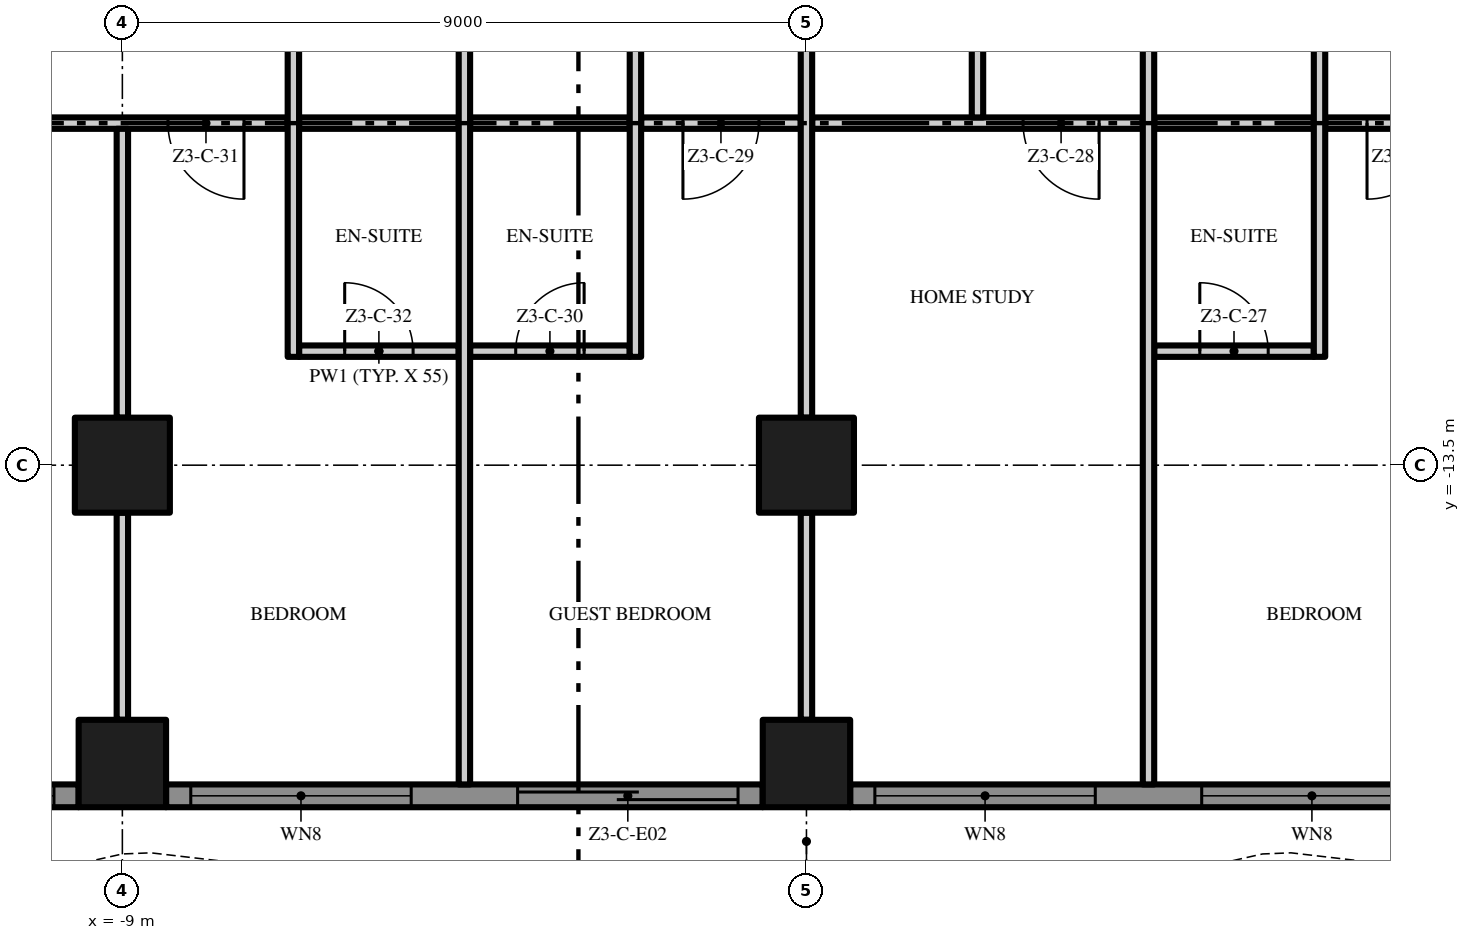
"""IFC4 building model, lengths in metres.
Left out: names, types, materials, properties, quantities, classifications, styles, units other than length and angle.
Written with IfcOpenShell. Run it as: python <this file> out.ifc"""

import sys

from ifc_helpers import new_model, si_unit, direction, frame, frame_2d, origin, origin_2d, place, context, subcontext, project, spatial, polyline, rectangle, outline, extrude, element, fill, save


model = new_model("IFC4")
c1 = context("Model", 3, precision=1e-05, world=origin(), true_north=direction((0.0, 1.0)))
c2 = subcontext(c1, "Body", "Model", "MODEL_VIEW")
j1 = project(units=[si_unit("LENGTHUNIT", "METRE"), si_unit("PLANEANGLEUNIT", "RADIAN")], contexts=[c1])
p1 = place(None, origin())
s1 = spatial("IfcSite", under=j1, at=p1, CompositionType="ELEMENT")
p2 = place(p1, origin())
s2 = spatial("IfcBuilding", under=s1, at=p2, CompositionType="ELEMENT")
p3 = place(p2, frame((0.0, 0.0, 147.8)))
s3 = spatial("IfcBuildingStorey", under=s2, at=p3, CompositionType="ELEMENT", Elevation=147.8)
p4 = place(p3, frame((-9.0, -13.5, 0.0), z_axis=(0.0, 0.0, 1.0), x_axis=(1.0, 0.0, 0.0)))
e1 = element("IfcColumn", 1, at=p4, inside=s3, PredefinedType="COLUMN", context=c2, shape_type="SweptSolid", body=[
    extrude(rectangle(XDim=1.25, YDim=1.25, at=origin_2d()), origin(), (0.0, 0.0, 1.0), 3.5),
])
p5 = place(p3, frame((-9.0, -17.425, 0.0), z_axis=(0.0, 0.0, 1.0), x_axis=(1.0, 0.0, 0.0)))
e2 = element("IfcColumn", 2, at=p5, inside=s3, PredefinedType="COLUMN", context=c2, shape_type="SweptSolid", body=[
    extrude(rectangle(XDim=1.15, YDim=1.15, at=origin_2d()), origin(), (0.0, 0.0, 1.0), 3.5),
])
p6 = place(p3, frame((0.0, -13.5, 0.0), z_axis=(0.0, 0.0, 1.0), x_axis=(1.0, 0.0, 0.0)))
e3 = element("IfcColumn", 3, at=p6, inside=s3, PredefinedType="COLUMN", context=c2, shape_type="SweptSolid", body=[
    extrude(rectangle(XDim=1.25, YDim=1.25, at=origin_2d()), origin(), (0.0, 0.0, 1.0), 3.5),
])
p7 = place(p3, frame((0.0, -17.425, 0.0), z_axis=(0.0, 0.0, 1.0), x_axis=(1.0, 0.0, 0.0)))
e4 = element("IfcColumn", 4, at=p7, inside=s3, PredefinedType="COLUMN", context=c2, shape_type="SweptSolid", body=[
    extrude(rectangle(XDim=1.15, YDim=1.15, at=origin_2d()), origin(), (0.0, 0.0, 1.0), 3.5),
])
p8 = place(p3, frame((-9.575, -17.85, 0.0), z_axis=(0.0, 0.0, 1.0), x_axis=(-1.0, 0.0, 0.0)))
e5 = element("IfcWall", 5, at=p8, inside=s3, PredefinedType="SOLIDWALL", context=c2, shape_type="SweptSolid", body=[
    extrude(rectangle(XDim=7.275, YDim=0.3, at=frame_2d((3.638, 0.0))), origin(), (0.0, 0.0, 1.0), 3.5),
])
p9 = place(p8, frame((4.625, 0.0, 0.0)))
e6 = element("IfcOpeningElement", 6, at=p9, cuts=e5, PredefinedType="OPENING", context=c2, shape_type="SweptSolid", body=[
    extrude(rectangle(XDim=2.35, YDim=2.4, at=frame_2d((1.175, 1.2))), frame((0.0, 0.16, 0.0), z_axis=(0.0, -1.0, 0.0), x_axis=(1.0, 0.0, 0.0)), (0.0, 0.0, 1.0), 0.32),
])
p10 = place(p8, frame((0.325, 0.0, 0.45)))
e7 = element("IfcOpeningElement", 7, at=p10, cuts=e5, PredefinedType="OPENING", context=c2, shape_type="SweptSolid", body=[
    extrude(rectangle(XDim=2.9, YDim=2.65, at=frame_2d((1.45, 1.325))), frame((0.0, 0.16, 0.0), z_axis=(0.0, -1.0, 0.0), x_axis=(1.0, 0.0, 0.0)), (0.0, 0.0, 1.0), 0.32),
])
p11 = place(p3, frame((-0.575, -17.85, 0.0), z_axis=(0.0, 0.0, 1.0), x_axis=(-1.0, 0.0, 0.0)))
e8 = element("IfcWall", 8, at=p11, inside=s3, PredefinedType="SOLIDWALL", context=c2, shape_type="SweptSolid", body=[
    extrude(rectangle(XDim=7.85, YDim=0.3, at=frame_2d((3.925, 0.0))), origin(), (0.0, 0.0, 1.0), 3.5),
])
p12 = place(p11, frame((4.625, 0.0, 0.45)))
e9 = element("IfcOpeningElement", 9, at=p12, cuts=e8, PredefinedType="OPENING", context=c2, shape_type="SweptSolid", body=[
    extrude(rectangle(XDim=2.9, YDim=2.65, at=frame_2d((1.45, 1.325))), frame((0.0, 0.16, 0.0), z_axis=(0.0, -1.0, 0.0), x_axis=(1.0, 0.0, 0.0)), (0.0, 0.0, 1.0), 0.32),
])
p13 = place(p11, frame((0.325, 0.0, 0.0)))
e10 = element("IfcOpeningElement", 10, at=p13, cuts=e8, PredefinedType="OPENING", context=c2, shape_type="SweptSolid", body=[
    extrude(rectangle(XDim=2.9, YDim=2.4, at=frame_2d((1.45, 1.2))), frame((0.0, 0.16, 0.0), z_axis=(0.0, -1.0, 0.0), x_axis=(1.0, 0.0, 0.0)), (0.0, 0.0, 1.0), 0.32),
])
p14 = place(p3, frame((8.425, -17.85, 0.0), z_axis=(0.0, 0.0, 1.0), x_axis=(-1.0, 0.0, 0.0)))
e11 = element("IfcWall", 11, at=p14, inside=s3, PredefinedType="SOLIDWALL", context=c2, shape_type="SweptSolid", body=[
    extrude(rectangle(XDim=7.85, YDim=0.3, at=frame_2d((3.925, 0.0))), origin(), (0.0, 0.0, 1.0), 3.5),
])
p15 = place(p14, frame((4.625, 0.0, 0.45)))
e12 = element("IfcOpeningElement", 12, at=p15, cuts=e11, PredefinedType="OPENING", context=c2, shape_type="SweptSolid", body=[
    extrude(rectangle(XDim=2.9, YDim=2.65, at=frame_2d((1.45, 1.325))), frame((0.0, 0.16, 0.0), z_axis=(0.0, -1.0, 0.0), x_axis=(1.0, 0.0, 0.0)), (0.0, 0.0, 1.0), 0.32),
])
p16 = place(p14, frame((0.325, 0.0, 0.45)))
e13 = element("IfcOpeningElement", 13, at=p16, cuts=e11, PredefinedType="OPENING", context=c2, shape_type="SweptSolid", body=[
    extrude(rectangle(XDim=2.9, YDim=2.65, at=frame_2d((1.45, 1.325))), frame((0.0, 0.16, 0.0), z_axis=(0.0, -1.0, 0.0), x_axis=(1.0, 0.0, 0.0)), (0.0, 0.0, 1.0), 0.32),
])
p17 = place(p3, origin())
e14 = element("IfcWall", 14, at=p17, inside=s3, PredefinedType="USERDEFINED", context=c2, shape_type="SweptSolid", body=[
    extrude(outline(polyline([(-18.0, -20.649), (-16.5, -20.985), (-16.125, -21.0), (-15.0, -20.869), (-13.5, -20.345), (-12.0, -19.612), (-10.5, -18.951), (-9.0, -18.615), (-8.625, -18.6), (-7.5, -18.731), (-6.0, -19.255), (-4.5, -19.988), (-3.0, -20.649), (-1.5, -20.985), (-1.125, -21.0), (0.0, -20.869), (1.5, -20.345), (3.0, -19.612), (4.5, -18.951), (6.0, -18.615), (6.375, -18.6), (7.5, -18.731), (9.0, -19.255), (10.5, -19.988), (12.0, -20.649), (13.5, -20.985), (13.875, -21.0), (15.0, -20.869), (16.5, -20.345), (18.0, -19.612), (17.89, -19.388), (16.404, -20.114), (14.944, -20.624), (13.865, -20.749), (13.533, -20.736), (12.079, -20.41), (10.605, -19.761), (9.096, -19.024), (7.556, -18.486), (6.385, -18.349), (5.967, -18.366), (4.421, -18.713), (2.895, -19.385), (1.404, -20.114), (-0.056, -20.624), (-1.135, -20.749), (-1.467, -20.736), (-2.921, -20.41), (-4.395, -19.761), (-5.904, -19.024), (-7.444, -18.486), (-8.615, -18.349), (-9.033, -18.366), (-10.579, -18.713), (-12.105, -19.385), (-13.596, -20.114), (-15.056, -20.624), (-16.135, -20.749), (-16.467, -20.736), (-17.945, -20.405), (-18.0, -20.649)])), origin(), (0.0, 0.0, 1.0), 0.9),
])
p18 = place(p3, frame((-6.675, -12.0, 0.0), z_axis=(0.0, 0.0, 1.0), x_axis=(1.0, 0.0, 0.0)))
e15 = element("IfcWall", 15, at=p18, inside=s3, PredefinedType="PARTITIONING", context=c2, shape_type="SweptSolid", body=[
    extrude(rectangle(XDim=2.1, YDim=0.15, at=frame_2d((1.05, 0.0))), origin(), (0.0, 0.0, 1.0), 3.5),
])
p19 = place(p18, frame((0.6, 0.0, 0.0)))
e16 = element("IfcOpeningElement", 16, at=p19, cuts=e15, PredefinedType="OPENING", context=c2, shape_type="SweptSolid", body=[
    extrude(rectangle(XDim=0.9, YDim=2.1, at=frame_2d((0.45, 1.05))), frame((0.0, 0.085, 0.0), z_axis=(0.0, -1.0, 0.0), x_axis=(1.0, 0.0, 0.0)), (0.0, 0.0, 1.0), 0.17),
])
p20 = place(p3, frame((-4.425, -12.0, 0.0), z_axis=(0.0, 0.0, 1.0), x_axis=(1.0, 0.0, 0.0)))
e17 = element("IfcWall", 17, at=p20, inside=s3, PredefinedType="PARTITIONING", context=c2, shape_type="SweptSolid", body=[
    extrude(rectangle(XDim=2.1, YDim=0.15, at=frame_2d((1.05, 0.0))), origin(), (0.0, 0.0, 1.0), 3.5),
])
p21 = place(p20, frame((0.6, 0.0, 0.0)))
e18 = element("IfcOpeningElement", 18, at=p21, cuts=e17, PredefinedType="OPENING", context=c2, shape_type="SweptSolid", body=[
    extrude(rectangle(XDim=0.9, YDim=2.1, at=frame_2d((0.45, 1.05))), frame((0.0, 0.085, 0.0), z_axis=(0.0, -1.0, 0.0), x_axis=(1.0, 0.0, 0.0)), (0.0, 0.0, 1.0), 0.17),
])
p22 = place(p3, frame((4.575, -12.0, 0.0), z_axis=(0.0, 0.0, 1.0), x_axis=(1.0, 0.0, 0.0)))
e19 = element("IfcWall", 19, at=p22, inside=s3, PredefinedType="PARTITIONING", context=c2, shape_type="SweptSolid", body=[
    extrude(rectangle(XDim=2.1, YDim=0.15, at=frame_2d((1.05, 0.0))), origin(), (0.0, 0.0, 1.0), 3.5),
])
p23 = place(p22, frame((0.6, 0.0, 0.0)))
e20 = element("IfcOpeningElement", 20, at=p23, cuts=e19, PredefinedType="OPENING", context=c2, shape_type="SweptSolid", body=[
    extrude(rectangle(XDim=0.9, YDim=2.1, at=frame_2d((0.45, 1.05))), frame((0.0, 0.085, 0.0), z_axis=(0.0, -1.0, 0.0), x_axis=(1.0, 0.0, 0.0)), (0.0, 0.0, 1.0), 0.17),
])
p24 = place(p3, frame((-6.825, -9.0, 0.0), z_axis=(0.0, 0.0, 1.0), x_axis=(-1.0, 0.0, 0.0)))
e21 = element("IfcWall", 21, at=p24, inside=s3, PredefinedType="PARTITIONING", context=c2, shape_type="SweptSolid", body=[
    extrude(rectangle(XDim=11.1, YDim=0.15, at=frame_2d((5.55, 0.0))), origin(), (0.0, 0.0, 1.0), 3.5),
])
p25 = place(p24, frame((0.575, 0.0, 0.0)))
e22 = element("IfcOpeningElement", 22, at=p25, cuts=e21, PredefinedType="OPENING", context=c2, shape_type="SweptSolid", body=[
    extrude(rectangle(XDim=1.0, YDim=2.4, at=frame_2d((0.5, 1.2))), frame((0.0, 0.085, 0.0), z_axis=(0.0, -1.0, 0.0), x_axis=(1.0, 0.0, 0.0)), (0.0, 0.0, 1.0), 0.17),
])
p26 = place(p24, frame((3.325, 0.0, 0.0)))
e23 = element("IfcOpeningElement", 23, at=p26, cuts=e21, PredefinedType="OPENING", context=c2, shape_type="SweptSolid", body=[
    extrude(rectangle(XDim=1.5, YDim=2.4, at=frame_2d((0.75, 1.2))), frame((0.0, 0.085, 0.0), z_axis=(0.0, -1.0, 0.0), x_axis=(1.0, 0.0, 0.0)), (0.0, 0.0, 1.0), 0.17),
])
for number, where, z_axis, x_axis in (
    (24, (-6.675, -9.0, 0.0), (0.0, 0.0, 1.0), (1.0, 0.0, 0.0)),
    (25, (-4.425, -9.0, 0.0), (0.0, 0.0, 1.0), (1.0, 0.0, 0.0)),
):
    element("IfcWall", number, at=place(p3, frame(where, z_axis=z_axis, x_axis=x_axis)), inside=s3, PredefinedType="PARTITIONING", context=c2, shape_type="SweptSolid", body=[
        extrude(rectangle(XDim=2.1, YDim=0.15, at=frame_2d((1.05, 0.0))), origin(), (0.0, 0.0, 1.0), 3.5),
    ])
p27 = place(p3, frame((-0.075, -9.0, 0.0), z_axis=(0.0, 0.0, 1.0), x_axis=(-1.0, 0.0, 0.0)))
e26 = element("IfcWall", 26, at=p27, inside=s3, PredefinedType="PARTITIONING", context=c2, shape_type="SweptSolid", body=[
    extrude(rectangle(XDim=2.1, YDim=0.15, at=frame_2d((1.05, 0.0))), origin(), (0.0, 0.0, 1.0), 3.5),
])
p28 = place(p27, frame((0.55, 0.0, 0.0)))
e27 = element("IfcOpeningElement", 27, at=p28, cuts=e26, PredefinedType="OPENING", context=c2, shape_type="SweptSolid", body=[
    extrude(rectangle(XDim=1.0, YDim=2.4, at=frame_2d((0.5, 1.2))), frame((0.0, 0.085, 0.0), z_axis=(0.0, -1.0, 0.0), x_axis=(1.0, 0.0, 0.0)), (0.0, 0.0, 1.0), 0.17),
])
p29 = place(p3, frame((4.425, -9.0, 0.0), z_axis=(0.0, 0.0, 1.0), x_axis=(-1.0, 0.0, 0.0)))
e28 = element("IfcWall", 28, at=p29, inside=s3, PredefinedType="PARTITIONING", context=c2, shape_type="SweptSolid", body=[
    extrude(rectangle(XDim=4.35, YDim=0.15, at=frame_2d((2.175, 0.0))), origin(), (0.0, 0.0, 1.0), 3.5),
])
p30 = place(p29, frame((0.575, 0.0, 0.0)))
e29 = element("IfcOpeningElement", 29, at=p30, cuts=e28, PredefinedType="OPENING", context=c2, shape_type="SweptSolid", body=[
    extrude(rectangle(XDim=1.0, YDim=2.4, at=frame_2d((0.5, 1.2))), frame((0.0, 0.085, 0.0), z_axis=(0.0, -1.0, 0.0), x_axis=(1.0, 0.0, 0.0)), (0.0, 0.0, 1.0), 0.17),
])
p31 = place(p3, frame((4.575, -9.0, 0.0), z_axis=(0.0, 0.0, 1.0), x_axis=(1.0, 0.0, 0.0)))
e30 = element("IfcWall", 30, at=p31, inside=s3, PredefinedType="PARTITIONING", context=c2, shape_type="SweptSolid", body=[
    extrude(rectangle(XDim=2.1, YDim=0.15, at=frame_2d((1.05, 0.0))), origin(), (0.0, 0.0, 1.0), 3.5),
])
p32 = place(p3, frame((11.175, -9.0, 0.0), z_axis=(0.0, 0.0, 1.0), x_axis=(-1.0, 0.0, 0.0)))
e31 = element("IfcWall", 31, at=p32, inside=s3, PredefinedType="PARTITIONING", context=c2, shape_type="SweptSolid", body=[
    extrude(rectangle(XDim=4.35, YDim=0.15, at=frame_2d((2.175, 0.0))), origin(), (0.0, 0.0, 1.0), 3.5),
])
p33 = place(p32, frame((0.575, 0.0, 0.0)))
e32 = element("IfcOpeningElement", 32, at=p33, cuts=e31, PredefinedType="OPENING", context=c2, shape_type="SweptSolid", body=[
    extrude(rectangle(XDim=1.0, YDim=2.4, at=frame_2d((0.5, 1.2))), frame((0.0, 0.085, 0.0), z_axis=(0.0, -1.0, 0.0), x_axis=(1.0, 0.0, 0.0)), (0.0, 0.0, 1.0), 0.17),
])
p34 = place(p32, frame((2.8, 0.0, 0.0)))
e33 = element("IfcOpeningElement", 33, at=p34, cuts=e31, PredefinedType="OPENING", context=c2, shape_type="SweptSolid", body=[
    extrude(rectangle(XDim=1.0, YDim=2.4, at=frame_2d((0.5, 1.2))), frame((0.0, 0.085, 0.0), z_axis=(0.0, -1.0, 0.0), x_axis=(1.0, 0.0, 0.0)), (0.0, 0.0, 1.0), 0.17),
])
p35 = place(p3, frame((-9.0, -16.85, 0.0), z_axis=(0.0, 0.0, 1.0), x_axis=(0.0, 1.0, 0.0)))
e34 = element("IfcWall", 34, at=p35, inside=s3, PredefinedType="PARTITIONING", context=c2, shape_type="SweptSolid", body=[
    extrude(rectangle(XDim=2.725, YDim=0.15, at=frame_2d((1.363, 0.0))), origin(), (0.0, 0.0, 1.0), 3.5),
])
p36 = place(p3, frame((-9.0, -12.875, 0.0), z_axis=(0.0, 0.0, 1.0), x_axis=(0.0, 1.0, 0.0)))
e35 = element("IfcWall", 35, at=p36, inside=s3, PredefinedType="PARTITIONING", context=c2, shape_type="SweptSolid", body=[
    extrude(rectangle(XDim=3.8, YDim=0.15, at=frame_2d((1.9, 0.0))), origin(), (0.0, 0.0, 1.0), 3.5),
])
p37 = place(p3, frame((-6.75, -12.075, 0.0), z_axis=(0.0, 0.0, 1.0), x_axis=(0.0, 1.0, 0.0)))
e36 = element("IfcWall", 36, at=p37, inside=s3, PredefinedType="PARTITIONING", context=c2, shape_type="SweptSolid", body=[
    extrude(rectangle(XDim=7.65, YDim=0.15, at=frame_2d((3.825, 0.0))), origin(), (0.0, 0.0, 1.0), 3.5),
])
p38 = place(p3, frame((-4.5, -17.7, 0.0), z_axis=(0.0, 0.0, 1.0), x_axis=(0.0, 1.0, 0.0)))
e37 = element("IfcWall", 37, at=p38, inside=s3, PredefinedType="PARTITIONING", context=c2, shape_type="SweptSolid", body=[
    extrude(rectangle(XDim=13.125, YDim=0.15, at=frame_2d((6.562, 0.0))), origin(), (0.0, 0.0, 1.0), 3.5),
])
p39 = place(p3, frame((-2.25, -12.075, 0.0), z_axis=(0.0, 0.0, 1.0), x_axis=(0.0, 1.0, 0.0)))
e38 = element("IfcWall", 38, at=p39, inside=s3, PredefinedType="PARTITIONING", context=c2, shape_type="SweptSolid", body=[
    extrude(rectangle(XDim=7.65, YDim=0.15, at=frame_2d((3.825, 0.0))), origin(), (0.0, 0.0, 1.0), 3.5),
])
p40 = place(p3, frame((0.0, -16.85, 0.0), z_axis=(0.0, 0.0, 1.0), x_axis=(0.0, 1.0, 0.0)))
e39 = element("IfcWall", 39, at=p40, inside=s3, PredefinedType="PARTITIONING", context=c2, shape_type="SweptSolid", body=[
    extrude(rectangle(XDim=2.725, YDim=0.15, at=frame_2d((1.363, 0.0))), origin(), (0.0, 0.0, 1.0), 3.5),
])
p41 = place(p3, frame((0.0, -12.875, 0.0), z_axis=(0.0, 0.0, 1.0), x_axis=(0.0, 1.0, 0.0)))
e40 = element("IfcWall", 40, at=p41, inside=s3, PredefinedType="PARTITIONING", context=c2, shape_type="SweptSolid", body=[
    extrude(rectangle(XDim=7.75, YDim=0.15, at=frame_2d((3.875, 0.0))), origin(), (0.0, 0.0, 1.0), 3.5),
])
p42 = place(p3, frame((2.25, -8.925, 0.0), z_axis=(0.0, 0.0, 1.0), x_axis=(0.0, 1.0, 0.0)))
e41 = element("IfcWall", 41, at=p42, inside=s3, PredefinedType="PARTITIONING", context=c2, shape_type="SweptSolid", body=[
    extrude(rectangle(XDim=4.5, YDim=0.15, at=frame_2d((2.25, 0.0))), origin(), (0.0, 0.0, 1.0), 3.5),
])
p43 = place(p3, frame((4.5, -17.7, 0.0), z_axis=(0.0, 0.0, 1.0), x_axis=(0.0, 1.0, 0.0)))
e42 = element("IfcWall", 42, at=p43, inside=s3, PredefinedType="PARTITIONING", context=c2, shape_type="SweptSolid", body=[
    extrude(rectangle(XDim=13.275, YDim=0.15, at=frame_2d((6.638, 0.0))), origin(), (0.0, 0.0, 1.0), 3.5),
])
p44 = place(p3, frame((6.75, -12.075, 0.0), z_axis=(0.0, 0.0, 1.0), x_axis=(0.0, 1.0, 0.0)))
e43 = element("IfcWall", 43, at=p44, inside=s3, PredefinedType="PARTITIONING", context=c2, shape_type="SweptSolid", body=[
    extrude(rectangle(XDim=7.65, YDim=0.15, at=frame_2d((3.825, 0.0))), origin(), (0.0, 0.0, 1.0), 3.5),
])
p45 = place(p10, origin())
e44 = element("IfcWindow", 44, at=p45, inside=s3, PartitioningType="SINGLE_PANEL", PredefinedType="WINDOW", context=c2, shape_type="SweptSolid", body=[
    extrude(rectangle(XDim=2.9, YDim=2.65, at=frame_2d((1.45, 1.325))), frame((0.0, 0.03, 0.0), z_axis=(0.0, -1.0, 0.0), x_axis=(1.0, 0.0, 0.0)), (0.0, 0.0, 1.0), 0.06),
])
fill(e7, e44)
p46 = place(p12, origin())
e45 = element("IfcWindow", 45, at=p46, inside=s3, PartitioningType="SINGLE_PANEL", PredefinedType="WINDOW", context=c2, shape_type="SweptSolid", body=[
    extrude(rectangle(XDim=2.9, YDim=2.65, at=frame_2d((1.45, 1.325))), frame((0.0, 0.03, 0.0), z_axis=(0.0, -1.0, 0.0), x_axis=(1.0, 0.0, 0.0)), (0.0, 0.0, 1.0), 0.06),
])
fill(e9, e45)
p47 = place(p13, origin())
e46 = element("IfcDoor", 46, at=p47, inside=s3, OperationType="SINGLE_SWING_LEFT", PredefinedType="DOOR", context=c2, shape_type="SweptSolid", body=[
    extrude(rectangle(XDim=2.9, YDim=2.4, at=frame_2d((1.45, 1.2))), frame((0.0, 0.025, 0.0), z_axis=(0.0, -1.0, 0.0), x_axis=(1.0, 0.0, 0.0)), (0.0, 0.0, 1.0), 0.05),
])
fill(e10, e46)
p48 = place(p15, origin())
e47 = element("IfcWindow", 47, at=p48, inside=s3, PartitioningType="SINGLE_PANEL", PredefinedType="WINDOW", context=c2, shape_type="SweptSolid", body=[
    extrude(rectangle(XDim=2.9, YDim=2.65, at=frame_2d((1.45, 1.325))), frame((0.0, 0.03, 0.0), z_axis=(0.0, -1.0, 0.0), x_axis=(1.0, 0.0, 0.0)), (0.0, 0.0, 1.0), 0.06),
])
fill(e12, e47)
p49 = place(p16, origin())
e48 = element("IfcWindow", 48, at=p49, inside=s3, PartitioningType="SINGLE_PANEL", PredefinedType="WINDOW", context=c2, shape_type="SweptSolid", body=[
    extrude(rectangle(XDim=2.9, YDim=2.65, at=frame_2d((1.45, 1.325))), frame((0.0, 0.03, 0.0), z_axis=(0.0, -1.0, 0.0), x_axis=(1.0, 0.0, 0.0)), (0.0, 0.0, 1.0), 0.06),
])
fill(e13, e48)
p50 = place(p34, origin())
e49 = element("IfcDoor", 49, at=p50, inside=s3, OperationType="SINGLE_SWING_RIGHT", PredefinedType="DOOR", context=c2, shape_type="SweptSolid", body=[
    extrude(rectangle(XDim=1.0, YDim=2.4, at=frame_2d((0.5, 1.2))), frame((0.0, 0.025, 0.0), z_axis=(0.0, -1.0, 0.0), x_axis=(1.0, 0.0, 0.0)), (0.0, 0.0, 1.0), 0.05),
])
fill(e33, e49)
p51 = place(p23, origin())
e50 = element("IfcDoor", 50, at=p51, inside=s3, OperationType="SINGLE_SWING_LEFT", PredefinedType="DOOR", context=c2, shape_type="SweptSolid", body=[
    extrude(rectangle(XDim=0.9, YDim=2.1, at=frame_2d((0.45, 1.05))), frame((0.0, 0.025, 0.0), z_axis=(0.0, -1.0, 0.0), x_axis=(1.0, 0.0, 0.0)), (0.0, 0.0, 1.0), 0.05),
])
fill(e20, e50)
p52 = place(p30, origin())
e51 = element("IfcDoor", 51, at=p52, inside=s3, OperationType="SINGLE_SWING_LEFT", PredefinedType="DOOR", context=c2, shape_type="SweptSolid", body=[
    extrude(rectangle(XDim=1.0, YDim=2.4, at=frame_2d((0.5, 1.2))), frame((0.0, 0.025, 0.0), z_axis=(0.0, -1.0, 0.0), x_axis=(1.0, 0.0, 0.0)), (0.0, 0.0, 1.0), 0.05),
])
fill(e29, e51)
p53 = place(p28, origin())
e52 = element("IfcDoor", 52, at=p53, inside=s3, OperationType="SINGLE_SWING_RIGHT", PredefinedType="DOOR", context=c2, shape_type="SweptSolid", body=[
    extrude(rectangle(XDim=1.0, YDim=2.4, at=frame_2d((0.5, 1.2))), frame((0.0, 0.025, 0.0), z_axis=(0.0, -1.0, 0.0), x_axis=(1.0, 0.0, 0.0)), (0.0, 0.0, 1.0), 0.05),
])
fill(e27, e52)
p54 = place(p21, origin())
e53 = element("IfcDoor", 53, at=p54, inside=s3, OperationType="SINGLE_SWING_RIGHT", PredefinedType="DOOR", context=c2, shape_type="SweptSolid", body=[
    extrude(rectangle(XDim=0.9, YDim=2.1, at=frame_2d((0.45, 1.05))), frame((0.0, 0.025, 0.0), z_axis=(0.0, -1.0, 0.0), x_axis=(1.0, 0.0, 0.0)), (0.0, 0.0, 1.0), 0.05),
])
fill(e18, e53)
p55 = place(p25, origin())
e54 = element("IfcDoor", 54, at=p55, inside=s3, OperationType="SINGLE_SWING_LEFT", PredefinedType="DOOR", context=c2, shape_type="SweptSolid", body=[
    extrude(rectangle(XDim=1.0, YDim=2.4, at=frame_2d((0.5, 1.2))), frame((0.0, 0.025, 0.0), z_axis=(0.0, -1.0, 0.0), x_axis=(1.0, 0.0, 0.0)), (0.0, 0.0, 1.0), 0.05),
])
fill(e22, e54)
p56 = place(p19, origin())
e55 = element("IfcDoor", 55, at=p56, inside=s3, OperationType="SINGLE_SWING_LEFT", PredefinedType="DOOR", context=c2, shape_type="SweptSolid", body=[
    extrude(rectangle(XDim=0.9, YDim=2.1, at=frame_2d((0.45, 1.05))), frame((0.0, 0.025, 0.0), z_axis=(0.0, -1.0, 0.0), x_axis=(1.0, 0.0, 0.0)), (0.0, 0.0, 1.0), 0.05),
])
fill(e16, e55)
save(model, sys.argv[1])
